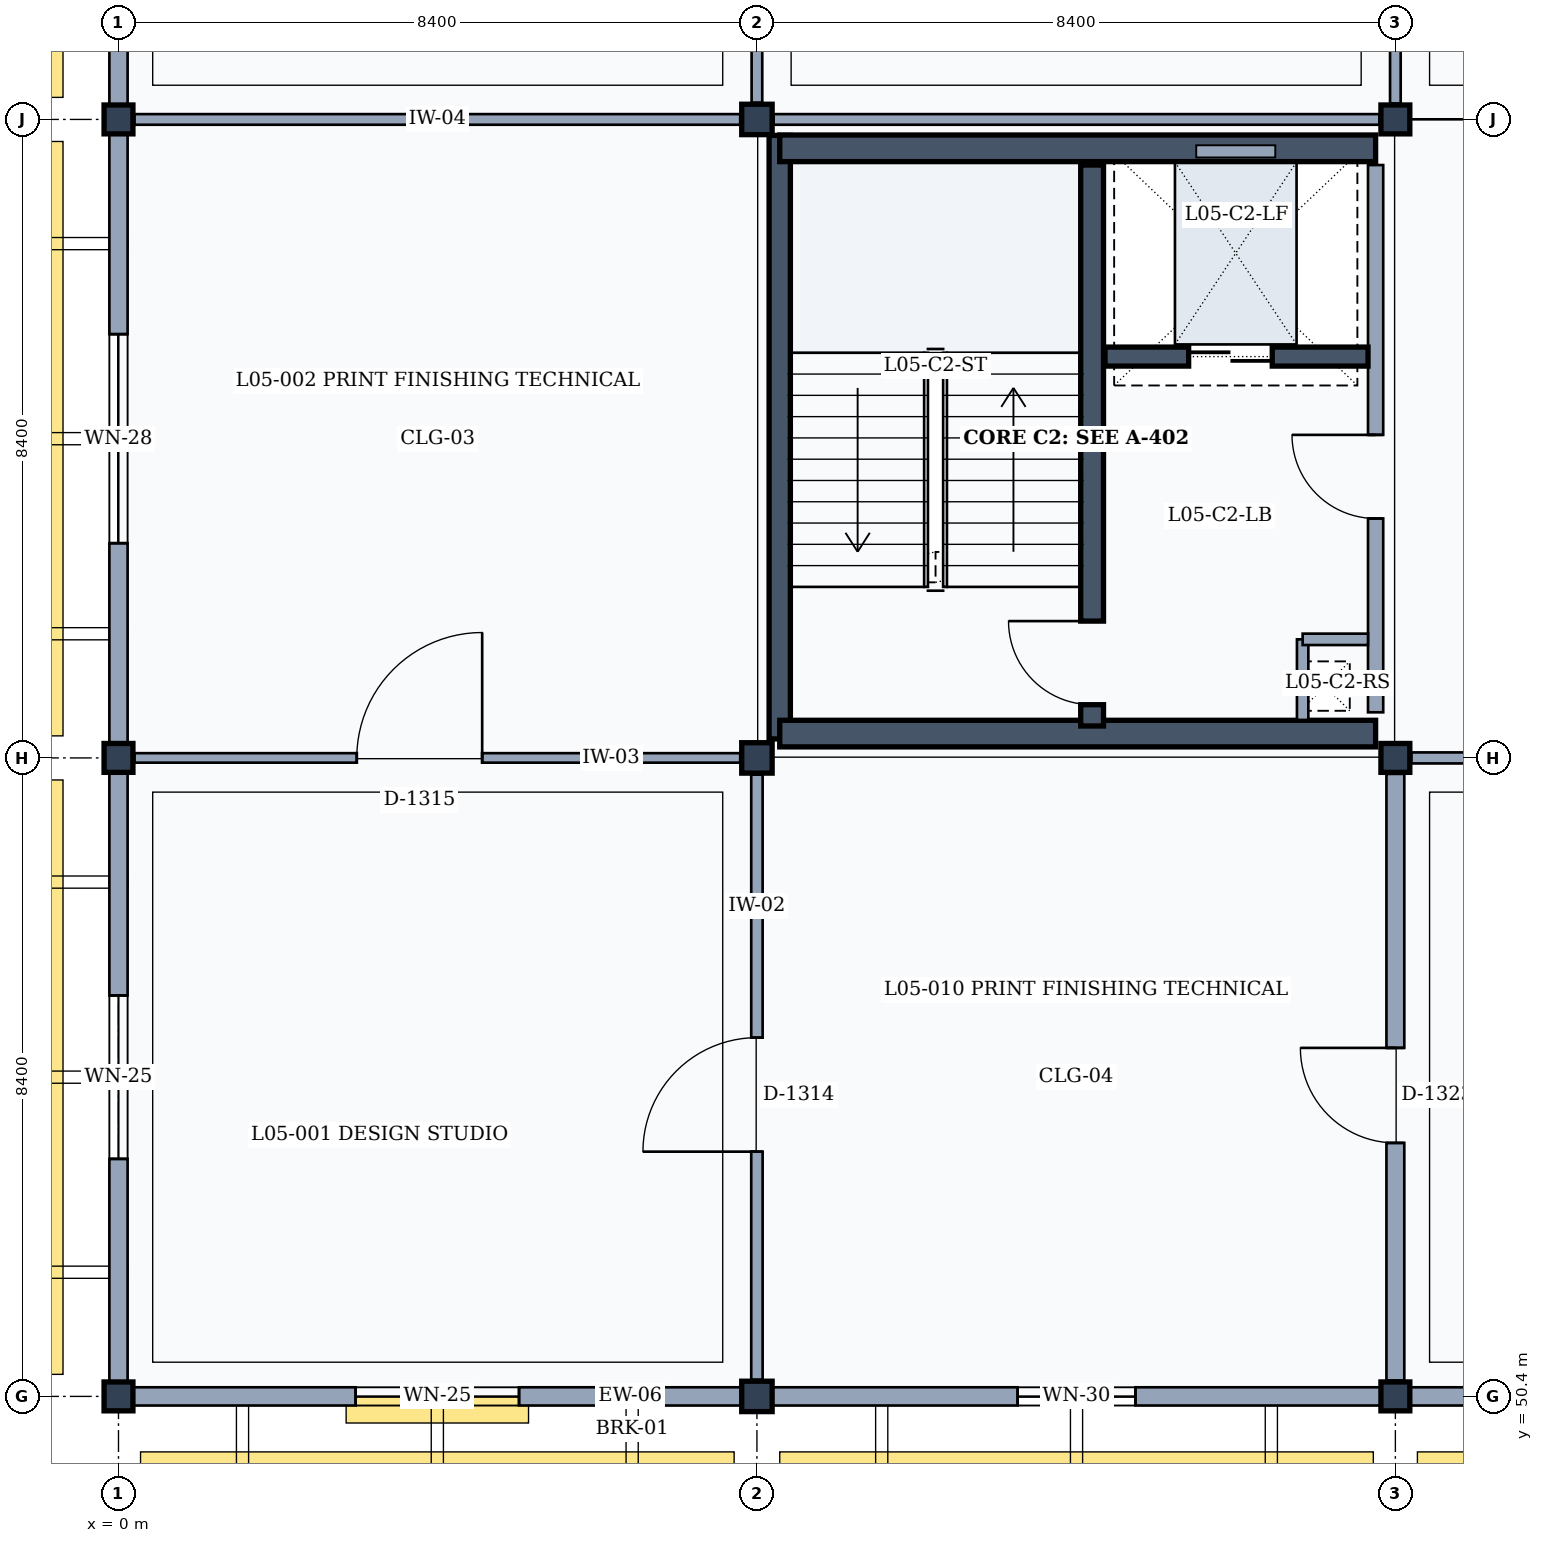
"""IFC4 building model, lengths in metres.
Left out: names, types, materials, properties, quantities, classifications, styles, units other than length and angle.
Written with IfcOpenShell. Run it as: python <this file> out.ifc"""

import sys

from ifc_helpers import new_model, si_unit, direction, frame, frame_2d, origin, origin_2d, place, context, subcontext, project, spatial, rectangle, extrude, element, fill, save


model = new_model("IFC4")
c1 = context("Model", 3, precision=1e-05, world=origin(), true_north=direction((0.0, 1.0)))
c2 = subcontext(c1, "Body", "Model", "MODEL_VIEW")
j1 = project(units=[si_unit("LENGTHUNIT", "METRE"), si_unit("PLANEANGLEUNIT", "RADIAN")], contexts=[c1])
p1 = place(None, origin())
s1 = spatial("IfcSite", under=j1, at=p1, CompositionType="ELEMENT")
p2 = place(p1, origin())
s2 = spatial("IfcBuilding", under=s1, at=p2, CompositionType="ELEMENT")
p3 = place(p2, frame((0.0, 0.0, 22.2)))
s3 = spatial("IfcBuildingStorey", under=s2, at=p3, CompositionType="ELEMENT", Elevation=22.2)
for number, where, z_axis, x_axis in (
    (1, (0.0, 50.4, 0.0), (0.0, 0.0, 1.0), (1.0, 0.0, 0.0)),
    (2, (0.0, 58.8, 0.0), (0.0, 0.0, 1.0), (1.0, 0.0, 0.0)),
    (3, (0.0, 67.2, 0.0), (0.0, 0.0, 1.0), (1.0, 0.0, 0.0)),
):
    element("IfcColumn", number, at=place(p3, frame(where, z_axis=z_axis, x_axis=x_axis)), inside=s3, PredefinedType="COLUMN", context=c2, shape_type="SweptSolid", body=[
        extrude(rectangle(XDim=0.38, YDim=0.38, at=origin_2d()), origin(), (0.0, 0.0, 1.0), 4.2),
    ])
for number, where, z_axis, x_axis in (
    (4, (8.4, 50.4, 0.0), (0.0, 0.0, 1.0), (1.0, 0.0, 0.0)),
    (5, (8.4, 58.8, 0.0), (0.0, 0.0, 1.0), (1.0, 0.0, 0.0)),
    (6, (8.4, 67.2, 0.0), (0.0, 0.0, 1.0), (1.0, 0.0, 0.0)),
):
    element("IfcColumn", number, at=place(p3, frame(where, z_axis=z_axis, x_axis=x_axis)), inside=s3, PredefinedType="COLUMN", context=c2, shape_type="SweptSolid", body=[
        extrude(rectangle(XDim=0.4, YDim=0.4, at=origin_2d()), origin(), (0.0, 0.0, 1.0), 4.2),
    ])
for number, where, z_axis, x_axis in (
    (7, (16.8, 50.4, 0.0), (0.0, 0.0, 1.0), (1.0, 0.0, 0.0)),
    (8, (16.8, 58.8, 0.0), (0.0, 0.0, 1.0), (1.0, 0.0, 0.0)),
    (9, (16.8, 67.2, 0.0), (0.0, 0.0, 1.0), (1.0, 0.0, 0.0)),
):
    element("IfcColumn", number, at=place(p3, frame(where, z_axis=z_axis, x_axis=x_axis)), inside=s3, PredefinedType="COLUMN", context=c2, shape_type="SweptSolid", body=[
        extrude(rectangle(XDim=0.38, YDim=0.38, at=origin_2d()), origin(), (0.0, 0.0, 1.0), 4.2),
    ])
p4 = place(p3, frame((8.2, 50.4, 0.0), z_axis=(0.0, 0.0, 1.0), x_axis=(-1.0, 0.0, 0.0)))
e10 = element("IfcWall", 10, at=p4, inside=s3, PredefinedType="SOLIDWALL", context=c2, shape_type="SweptSolid", body=[
    extrude(rectangle(XDim=8.01, YDim=0.24, at=frame_2d((4.005, 0.0))), origin(), (0.0, 0.0, 1.0), 3.36),
])
p5 = place(p4, frame((2.93, 0.0, 0.9)))
e11 = element("IfcOpeningElement", 11, at=p5, cuts=e10, PredefinedType="OPENING", context=c2, shape_type="SweptSolid", body=[
    extrude(rectangle(XDim=2.15, YDim=1.85, at=frame_2d((1.075, 0.925))), frame((0.0, 0.13, 0.0), z_axis=(0.0, -1.0, 0.0), x_axis=(1.0, 0.0, 0.0)), (0.0, 0.0, 1.0), 0.26),
])
p6 = place(p3, frame((0.0, 50.59, 0.0), z_axis=(0.0, 0.0, 1.0), x_axis=(0.0, 1.0, 0.0)))
e12 = element("IfcWall", 12, at=p6, inside=s3, PredefinedType="SOLIDWALL", context=c2, shape_type="SweptSolid", body=[
    extrude(rectangle(XDim=8.02, YDim=0.24, at=frame_2d((4.01, 0.0))), origin(), (0.0, 0.0, 1.0), 3.36),
])
p7 = place(p6, frame((2.935, 0.0, 0.9)))
e13 = element("IfcOpeningElement", 13, at=p7, cuts=e12, PredefinedType="OPENING", context=c2, shape_type="SweptSolid", body=[
    extrude(rectangle(XDim=2.15, YDim=1.85, at=frame_2d((1.075, 0.925))), frame((0.0, 0.13, 0.0), z_axis=(0.0, -1.0, 0.0), x_axis=(1.0, 0.0, 0.0)), (0.0, 0.0, 1.0), 0.26),
])
p8 = place(p3, frame((0.0, 58.99, 0.0), z_axis=(0.0, 0.0, 1.0), x_axis=(0.0, 1.0, 0.0)))
e14 = element("IfcWall", 14, at=p8, inside=s3, PredefinedType="SOLIDWALL", context=c2, shape_type="SweptSolid", body=[
    extrude(rectangle(XDim=8.02, YDim=0.24, at=frame_2d((4.01, 0.0))), origin(), (0.0, 0.0, 1.0), 3.36),
])
p9 = place(p8, frame((2.635, 0.0, 0.9)))
e15 = element("IfcOpeningElement", 15, at=p9, cuts=e14, PredefinedType="OPENING", context=c2, shape_type="SweptSolid", body=[
    extrude(rectangle(XDim=2.75, YDim=1.85, at=frame_2d((1.375, 0.925))), frame((0.0, 0.13, 0.0), z_axis=(0.0, -1.0, 0.0), x_axis=(1.0, 0.0, 0.0)), (0.0, 0.0, 1.0), 0.26),
])
p10 = place(p3, frame((0.0, 67.39, 0.0), z_axis=(0.0, 0.0, 1.0), x_axis=(0.0, 1.0, 0.0)))
e16 = element("IfcWall", 16, at=p10, inside=s3, PredefinedType="SOLIDWALL", context=c2, shape_type="SweptSolid", body=[
    extrude(rectangle(XDim=8.02, YDim=0.24, at=frame_2d((4.01, 0.0))), origin(), (0.0, 0.0, 1.0), 3.36),
])
p11 = place(p10, frame((3.135, 0.0, 0.9)))
e17 = element("IfcOpeningElement", 17, at=p11, cuts=e16, PredefinedType="OPENING", context=c2, shape_type="SweptSolid", body=[
    extrude(rectangle(XDim=1.75, YDim=1.85, at=frame_2d((0.875, 0.925))), frame((0.0, 0.13, 0.0), z_axis=(0.0, -1.0, 0.0), x_axis=(1.0, 0.0, 0.0)), (0.0, 0.0, 1.0), 0.26),
])
p12 = place(p3, frame((16.61, 50.4, 0.0), z_axis=(0.0, 0.0, 1.0), x_axis=(-1.0, 0.0, 0.0)))
e18 = element("IfcWall", 18, at=p12, inside=s3, PredefinedType="SOLIDWALL", context=c2, shape_type="SweptSolid", body=[
    extrude(rectangle(XDim=8.01, YDim=0.24, at=frame_2d((4.005, 0.0))), origin(), (0.0, 0.0, 1.0), 3.36),
])
p13 = place(p12, frame((3.23, 0.0, 0.9)))
e19 = element("IfcOpeningElement", 19, at=p13, cuts=e18, PredefinedType="OPENING", context=c2, shape_type="SweptSolid", body=[
    extrude(rectangle(XDim=1.55, YDim=1.75, at=frame_2d((0.775, 0.875))), frame((0.0, 0.13, 0.0), z_axis=(0.0, -1.0, 0.0), x_axis=(1.0, 0.0, 0.0)), (0.0, 0.0, 1.0), 0.26),
])
p14 = place(p3, frame((25.0, 50.4, 0.0), z_axis=(0.0, 0.0, 1.0), x_axis=(-1.0, 0.0, 0.0)))
e20 = element("IfcWall", 20, at=p14, inside=s3, PredefinedType="SOLIDWALL", context=c2, shape_type="SweptSolid", body=[
    extrude(rectangle(XDim=8.01, YDim=0.24, at=frame_2d((4.005, 0.0))), origin(), (0.0, 0.0, 1.0), 3.36),
])
p15 = place(p14, frame((2.68, 0.0, 0.9)))
e21 = element("IfcOpeningElement", 21, at=p15, cuts=e20, PredefinedType="OPENING", context=c2, shape_type="SweptSolid", body=[
    extrude(rectangle(XDim=2.65, YDim=1.8, at=frame_2d((1.325, 0.9))), frame((0.0, 0.13, 0.0), z_axis=(0.0, -1.0, 0.0), x_axis=(1.0, 0.0, 0.0)), (0.0, 0.0, 1.0), 0.26),
])
p16 = place(p3, frame((8.7, 59.05, 0.0), z_axis=(0.0, 0.0, 1.0), x_axis=(0.0, 1.0, 0.0)))
e22 = element("IfcWall", 22, at=p16, inside=s3, PredefinedType="SHEAR", context=c2, shape_type="SweptSolid", body=[
    extrude(rectangle(XDim=7.94, YDim=0.28, at=frame_2d((3.97, 0.0))), origin(), (0.0, 0.0, 1.0), 3.98),
])
p17 = place(p3, frame((8.7, 66.82, 0.0), z_axis=(0.0, 0.0, 1.0), x_axis=(1.0, 0.0, 0.0)))
e23 = element("IfcWall", 23, at=p17, inside=s3, PredefinedType="SHEAR", context=c2, shape_type="SweptSolid", body=[
    extrude(rectangle(XDim=7.84, YDim=0.35, at=frame_2d((3.92, 0.0))), origin(), (0.0, 0.0, 1.0), 3.98),
])
p18 = place(p3, frame((16.54, 66.6, 0.0), z_axis=(0.0, 0.0, 1.0), x_axis=(0.0, -1.0, 0.0)))
e24 = element("IfcWall", 24, at=p18, inside=s3, PredefinedType="PARTITIONING", context=c2, shape_type="SweptSolid", body=[
    extrude(rectangle(XDim=7.2, YDim=0.2, at=frame_2d((3.6, 0.0))), origin(), (0.0, 0.0, 1.0), 3.32),
])
p19 = place(p18, frame((3.55, 0.0, 0.0)))
e25 = element("IfcOpeningElement", 25, at=p19, cuts=e24, PredefinedType="OPENING", context=c2, shape_type="SweptSolid", body=[
    extrude(rectangle(XDim=1.1, YDim=2.15, at=frame_2d((0.55, 1.075))), frame((0.0, 0.11, 0.0), z_axis=(0.0, -1.0, 0.0), x_axis=(1.0, 0.0, 0.0)), (0.0, 0.0, 1.0), 0.22),
])
p20 = place(p3, frame((16.54, 59.12, 0.0), z_axis=(0.0, 0.0, 1.0), x_axis=(-1.0, 0.0, 0.0)))
e26 = element("IfcWall", 26, at=p20, inside=s3, PredefinedType="SHEAR", context=c2, shape_type="SweptSolid", body=[
    extrude(rectangle(XDim=7.84, YDim=0.35, at=frame_2d((3.92, 0.0))), origin(), (0.0, 0.0, 1.0), 3.98),
])
p21 = place(p3, frame((12.81, 59.22, 0.0), z_axis=(0.0, 0.0, 1.0), x_axis=(0.0, 1.0, 0.0)))
e27 = element("IfcWall", 27, at=p21, inside=s3, PredefinedType="SHEAR", context=c2, shape_type="SweptSolid", body=[
    extrude(rectangle(XDim=7.38, YDim=0.3, at=frame_2d((3.69, 0.0))), origin(), (0.0, 0.0, 1.0), 3.98),
])
p22 = place(p21, frame((0.28, 0.0, 0.0)))
e28 = element("IfcOpeningElement", 28, at=p22, cuts=e27, PredefinedType="OPENING", context=c2, shape_type="SweptSolid", body=[
    extrude(rectangle(XDim=1.1, YDim=2.15, at=frame_2d((0.55, 1.075))), frame((0.0, 0.16, 0.0), z_axis=(0.0, -1.0, 0.0), x_axis=(1.0, 0.0, 0.0)), (0.0, 0.0, 1.0), 0.32),
])
p23 = place(p3, frame((15.58, 60.36, 0.0), z_axis=(0.0, 0.0, 1.0), x_axis=(0.0, -1.0, 0.0)))
e29 = element("IfcWall", 29, at=p23, inside=s3, PredefinedType="PARTITIONING", context=c2, shape_type="SweptSolid", body=[
    extrude(rectangle(XDim=1.06, YDim=0.15, at=frame_2d((0.53, 0.0))), origin(), (0.0, 0.0, 1.0), 3.32),
])
p24 = place(p3, frame((15.58, 60.36, 0.0), z_axis=(0.0, 0.0, 1.0), x_axis=(1.0, 0.0, 0.0)))
e30 = element("IfcWall", 30, at=p24, inside=s3, PredefinedType="PARTITIONING", context=c2, shape_type="SweptSolid", body=[
    extrude(rectangle(XDim=0.86, YDim=0.15, at=frame_2d((0.43, 0.0))), origin(), (0.0, 0.0, 1.0), 3.32),
])
p25 = place(p3, frame((12.98, 64.08, 0.0), z_axis=(0.0, 0.0, 1.0), x_axis=(1.0, 0.0, 0.0)))
e31 = element("IfcWall", 31, at=p25, inside=s3, PredefinedType="SHEAR", context=c2, shape_type="SweptSolid", body=[
    extrude(rectangle(XDim=3.46, YDim=0.25, at=frame_2d((1.73, 0.0))), origin(), (0.0, 0.0, 1.0), 3.98),
])
p26 = place(p25, frame((1.1, 0.0, 0.0)))
e32 = element("IfcOpeningElement", 32, at=p26, cuts=e31, PredefinedType="OPENING", context=c2, shape_type="SweptSolid", body=[
    extrude(rectangle(XDim=1.1, YDim=2.15, at=frame_2d((0.55, 1.075))), frame((0.0, 0.135, 0.0), z_axis=(0.0, -1.0, 0.0), x_axis=(1.0, 0.0, 0.0)), (0.0, 0.0, 1.0), 0.27),
])
p27 = place(p3, frame((8.4, 50.62, 0.0), z_axis=(0.0, 0.0, 1.0), x_axis=(0.0, 1.0, 0.0)))
e33 = element("IfcWall", 33, at=p27, inside=s3, PredefinedType="PARTITIONING", context=c2, shape_type="SweptSolid", body=[
    extrude(rectangle(XDim=7.96, YDim=0.15, at=frame_2d((3.98, 0.0))), origin(), (0.0, 0.0, 1.0), 3.32),
])
p28 = place(p27, frame((3.0, 0.0, 0.0)))
e34 = element("IfcOpeningElement", 34, at=p28, cuts=e33, PredefinedType="OPENING", context=c2, shape_type="SweptSolid", body=[
    extrude(rectangle(XDim=1.5, YDim=2.3, at=frame_2d((0.75, 1.15))), frame((0.0, 0.085, 0.0), z_axis=(0.0, -1.0, 0.0), x_axis=(1.0, 0.0, 0.0)), (0.0, 0.0, 1.0), 0.17),
])
p29 = place(p3, frame((0.21, 58.8, 0.0), z_axis=(0.0, 0.0, 1.0), x_axis=(1.0, 0.0, 0.0)))
e35 = element("IfcWall", 35, at=p29, inside=s3, PredefinedType="PARTITIONING", context=c2, shape_type="SweptSolid", body=[
    extrude(rectangle(XDim=7.97, YDim=0.125, at=frame_2d((3.985, 0.0))), origin(), (0.0, 0.0, 1.0), 3.32),
])
p30 = place(p29, frame((2.925, 0.0, 0.0)))
e36 = element("IfcOpeningElement", 36, at=p30, cuts=e35, PredefinedType="OPENING", context=c2, shape_type="SweptSolid", body=[
    extrude(rectangle(XDim=1.65, YDim=2.25, at=frame_2d((0.825, 1.125))), frame((0.0, 0.073, 0.0), z_axis=(0.0, -1.0, 0.0), x_axis=(1.0, 0.0, 0.0)), (0.0, 0.0, 1.0), 0.145),
])
p31 = place(p3, frame((0.21, 67.2, 0.0), z_axis=(0.0, 0.0, 1.0), x_axis=(1.0, 0.0, 0.0)))
e37 = element("IfcWall", 37, at=p31, inside=s3, PredefinedType="PARTITIONING", context=c2, shape_type="SweptSolid", body=[
    extrude(rectangle(XDim=7.97, YDim=0.14, at=frame_2d((3.985, 0.0))), origin(), (0.0, 0.0, 1.0), 3.32),
])
p32 = place(p3, frame((8.4, 67.42, 0.0), z_axis=(0.0, 0.0, 1.0), x_axis=(0.0, 1.0, 0.0)))
e38 = element("IfcWall", 38, at=p32, inside=s3, PredefinedType="PARTITIONING", context=c2, shape_type="SweptSolid", body=[
    extrude(rectangle(XDim=7.96, YDim=0.14, at=frame_2d((3.98, 0.0))), origin(), (0.0, 0.0, 1.0), 3.32),
])
p33 = place(p3, frame((16.8, 50.61, 0.0), z_axis=(0.0, 0.0, 1.0), x_axis=(0.0, 1.0, 0.0)))
e39 = element("IfcWall", 39, at=p33, inside=s3, PredefinedType="PARTITIONING", context=c2, shape_type="SweptSolid", body=[
    extrude(rectangle(XDim=7.98, YDim=0.235, at=frame_2d((3.99, 0.0))), origin(), (0.0, 0.0, 1.0), 3.32),
])
p34 = place(p33, frame((3.125, 0.0, 0.0)))
e40 = element("IfcOpeningElement", 40, at=p34, cuts=e39, PredefinedType="OPENING", context=c2, shape_type="SweptSolid", body=[
    extrude(rectangle(XDim=1.25, YDim=2.3, at=frame_2d((0.625, 1.15))), frame((0.0, 0.127, 0.0), z_axis=(0.0, -1.0, 0.0), x_axis=(1.0, 0.0, 0.0)), (0.0, 0.0, 1.0), 0.255),
])
p35 = place(p3, frame((8.62, 67.2, 0.0), z_axis=(0.0, 0.0, 1.0), x_axis=(1.0, 0.0, 0.0)))
e41 = element("IfcWall", 41, at=p35, inside=s3, PredefinedType="PARTITIONING", context=c2, shape_type="SweptSolid", body=[
    extrude(rectangle(XDim=7.97, YDim=0.14, at=frame_2d((3.985, 0.0))), origin(), (0.0, 0.0, 1.0), 3.32),
])
p36 = place(p3, frame((16.8, 67.41, 0.0), z_axis=(0.0, 0.0, 1.0), x_axis=(0.0, 1.0, 0.0)))
e42 = element("IfcWall", 42, at=p36, inside=s3, PredefinedType="PARTITIONING", context=c2, shape_type="SweptSolid", body=[
    extrude(rectangle(XDim=7.98, YDim=0.14, at=frame_2d((3.99, 0.0))), origin(), (0.0, 0.0, 1.0), 3.32),
])
p37 = place(p36, frame((3.275, 0.0, 0.0)))
e43 = element("IfcOpeningElement", 43, at=p37, cuts=e42, PredefinedType="OPENING", context=c2, shape_type="SweptSolid", body=[
    extrude(rectangle(XDim=0.95, YDim=2.15, at=frame_2d((0.475, 1.075))), frame((0.0, 0.08, 0.0), z_axis=(0.0, -1.0, 0.0), x_axis=(1.0, 0.0, 0.0)), (0.0, 0.0, 1.0), 0.16),
])
p38 = place(p3, frame((17.01, 58.8, 0.0), z_axis=(0.0, 0.0, 1.0), x_axis=(1.0, 0.0, 0.0)))
e44 = element("IfcWall", 44, at=p38, inside=s3, PredefinedType="PARTITIONING", context=c2, shape_type="SweptSolid", body=[
    extrude(rectangle(XDim=7.97, YDim=0.145, at=frame_2d((3.985, 0.0))), origin(), (0.0, 0.0, 1.0), 3.32),
])
p39 = place(p38, frame((3.05, 0.0, 0.0)))
e45 = element("IfcOpeningElement", 45, at=p39, cuts=e44, PredefinedType="OPENING", context=c2, shape_type="SweptSolid", body=[
    extrude(rectangle(XDim=1.4, YDim=2.25, at=frame_2d((0.7, 1.125))), frame((0.0, 0.083, 0.0), z_axis=(0.0, -1.0, 0.0), x_axis=(1.0, 0.0, 0.0)), (0.0, 0.0, 1.0), 0.165),
])
p40 = place(p5, origin())
e46 = element("IfcWindow", 46, at=p40, inside=s3, PartitioningType="SINGLE_PANEL", PredefinedType="WINDOW", context=c2, shape_type="SweptSolid", body=[
    extrude(rectangle(XDim=2.15, YDim=1.85, at=frame_2d((1.075, 0.925))), frame((0.0, 0.03, 0.0), z_axis=(0.0, -1.0, 0.0), x_axis=(1.0, 0.0, 0.0)), (0.0, 0.0, 1.0), 0.06),
])
fill(e11, e46)
p41 = place(p7, origin())
e47 = element("IfcWindow", 47, at=p41, inside=s3, PartitioningType="SINGLE_PANEL", PredefinedType="WINDOW", context=c2, shape_type="SweptSolid", body=[
    extrude(rectangle(XDim=2.15, YDim=1.85, at=frame_2d((1.075, 0.925))), frame((0.0, 0.03, 0.0), z_axis=(0.0, -1.0, 0.0), x_axis=(1.0, 0.0, 0.0)), (0.0, 0.0, 1.0), 0.06),
])
fill(e13, e47)
p42 = place(p9, origin())
e48 = element("IfcWindow", 48, at=p42, inside=s3, PartitioningType="SINGLE_PANEL", PredefinedType="WINDOW", context=c2, shape_type="SweptSolid", body=[
    extrude(rectangle(XDim=2.75, YDim=1.85, at=frame_2d((1.375, 0.925))), frame((0.0, 0.03, 0.0), z_axis=(0.0, -1.0, 0.0), x_axis=(1.0, 0.0, 0.0)), (0.0, 0.0, 1.0), 0.06),
])
fill(e15, e48)
p43 = place(p13, origin())
e49 = element("IfcWindow", 49, at=p43, inside=s3, PartitioningType="SINGLE_PANEL", PredefinedType="WINDOW", context=c2, shape_type="SweptSolid", body=[
    extrude(rectangle(XDim=1.55, YDim=1.75, at=frame_2d((0.775, 0.875))), frame((0.0, 0.03, 0.0), z_axis=(0.0, -1.0, 0.0), x_axis=(1.0, 0.0, 0.0)), (0.0, 0.0, 1.0), 0.06),
])
fill(e19, e49)
p44 = place(p19, frame((1.1, 0.0, 0.0), z_axis=(0.0, 0.0, 1.0), x_axis=(-1.0, 0.0, 0.0)))
e50 = element("IfcDoor", 50, at=p44, inside=s3, OperationType="SINGLE_SWING_RIGHT", PredefinedType="DOOR", context=c2, shape_type="SweptSolid", body=[
    extrude(rectangle(XDim=1.1, YDim=2.15, at=frame_2d((0.55, 1.075))), frame((0.0, 0.025, 0.0), z_axis=(0.0, -1.0, 0.0), x_axis=(1.0, 0.0, 0.0)), (0.0, 0.0, 1.0), 0.05),
])
fill(e25, e50)
p45 = place(p22, origin())
e51 = element("IfcDoor", 51, at=p45, inside=s3, OperationType="SINGLE_SWING_RIGHT", PredefinedType="DOOR", context=c2, shape_type="SweptSolid", body=[
    extrude(rectangle(XDim=1.1, YDim=2.15, at=frame_2d((0.55, 1.075))), frame((0.0, 0.025, 0.0), z_axis=(0.0, -1.0, 0.0), x_axis=(1.0, 0.0, 0.0)), (0.0, 0.0, 1.0), 0.05),
])
fill(e28, e51)
p46 = place(p26, origin())
e52 = element("IfcDoor", 52, at=p46, inside=s3, OperationType="DOUBLE_DOOR_SLIDING", PredefinedType="DOOR", context=c2, shape_type="SweptSolid", body=[
    extrude(rectangle(XDim=1.1, YDim=2.15, at=frame_2d((0.55, 1.075))), frame((0.0, 0.025, 0.0), z_axis=(0.0, -1.0, 0.0), x_axis=(1.0, 0.0, 0.0)), (0.0, 0.0, 1.0), 0.05),
])
fill(e32, e52)
p47 = place(p28, origin())
e53 = element("IfcDoor", 53, at=p47, inside=s3, OperationType="SINGLE_SWING_LEFT", PredefinedType="DOOR", context=c2, shape_type="SweptSolid", body=[
    extrude(rectangle(XDim=1.5, YDim=2.3, at=frame_2d((0.75, 1.15))), frame((0.0, 0.025, 0.0), z_axis=(0.0, -1.0, 0.0), x_axis=(1.0, 0.0, 0.0)), (0.0, 0.0, 1.0), 0.05),
])
fill(e34, e53)
p48 = place(p30, origin())
e54 = element("IfcDoor", 54, at=p48, inside=s3, OperationType="SINGLE_SWING_RIGHT", PredefinedType="DOOR", context=c2, shape_type="SweptSolid", body=[
    extrude(rectangle(XDim=1.65, YDim=2.25, at=frame_2d((0.825, 1.125))), frame((0.0, 0.025, 0.0), z_axis=(0.0, -1.0, 0.0), x_axis=(1.0, 0.0, 0.0)), (0.0, 0.0, 1.0), 0.05),
])
fill(e36, e54)
p49 = place(p34, origin())
e55 = element("IfcDoor", 55, at=p49, inside=s3, OperationType="SINGLE_SWING_RIGHT", PredefinedType="DOOR", context=c2, shape_type="SweptSolid", body=[
    extrude(rectangle(XDim=1.25, YDim=2.3, at=frame_2d((0.625, 1.15))), frame((0.0, 0.025, 0.0), z_axis=(0.0, -1.0, 0.0), x_axis=(1.0, 0.0, 0.0)), (0.0, 0.0, 1.0), 0.05),
])
fill(e40, e55)
save(model, sys.argv[1])
